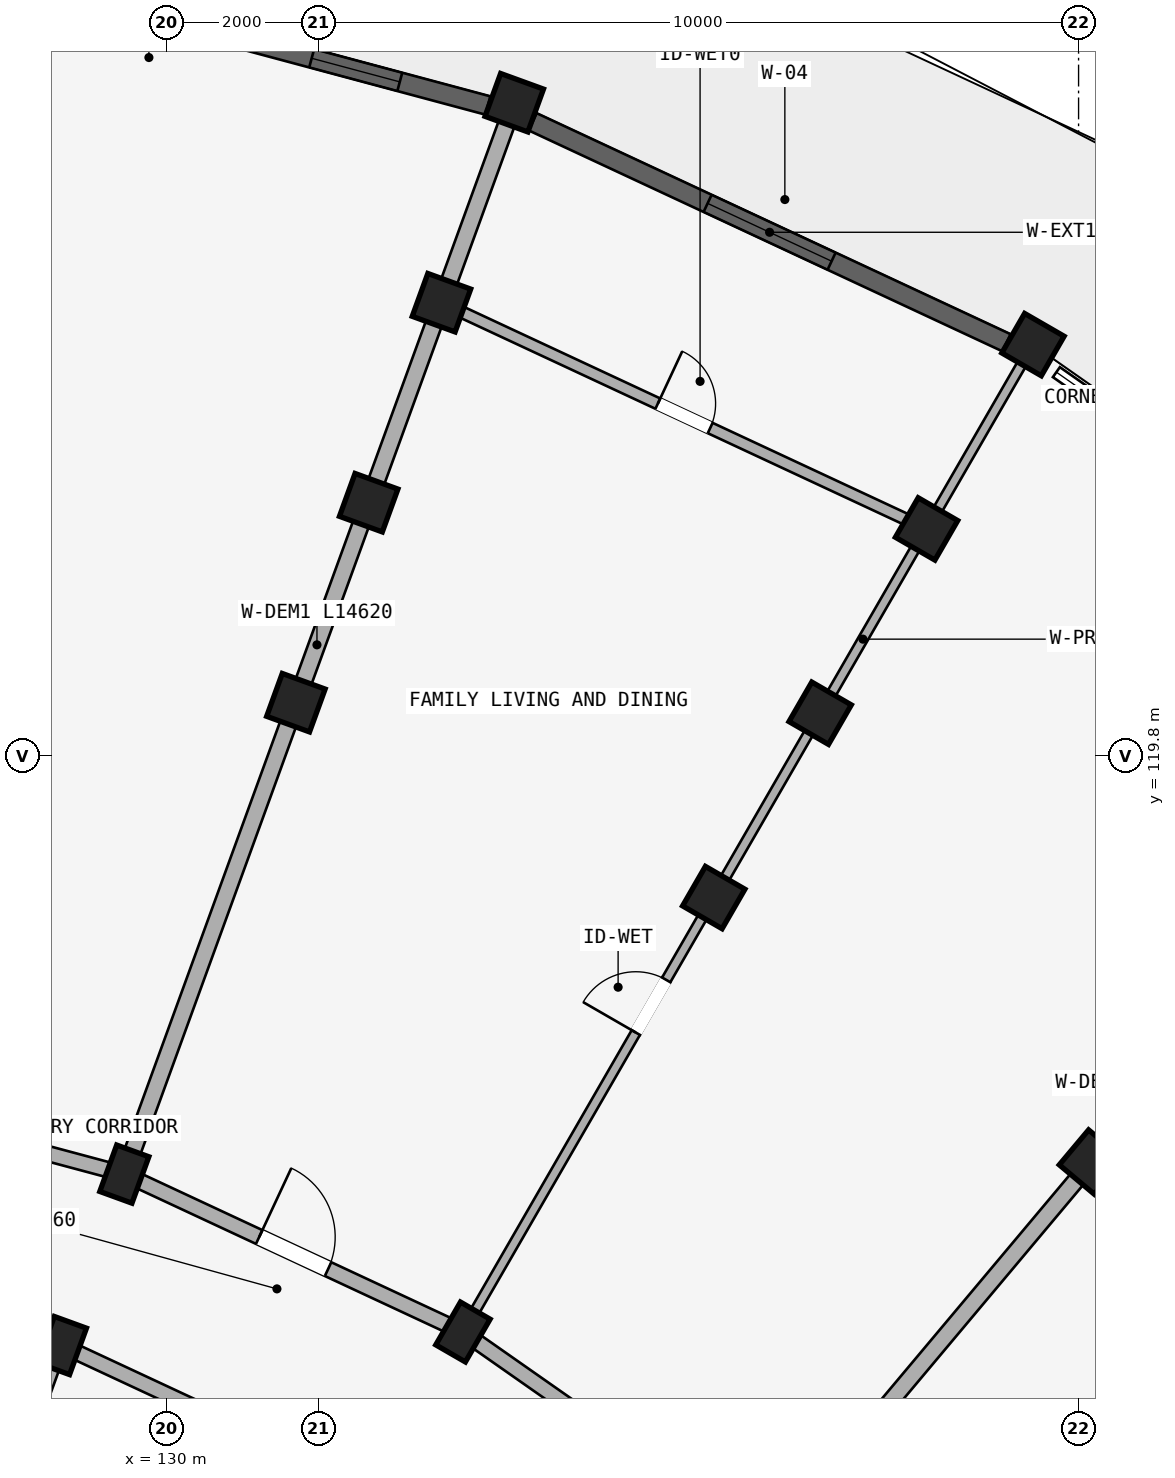
"""IFC4 building model, lengths in metres.
Left out: names, types, materials, properties, quantities, classifications, styles, units other than length and angle.
Written with IfcOpenShell. Run it as: python <this file> out.ifc"""

import sys

from ifc_helpers import new_model, si_unit, direction, frame, frame_2d, origin, origin_2d, place, context, subcontext, project, spatial, rectangle, extrude, element, fill, save


model = new_model("IFC4")
c1 = context("Model", 3, precision=1e-05, world=origin(), true_north=direction((0.0, 1.0)))
c2 = subcontext(c1, "Body", "Model", "MODEL_VIEW")
j1 = project(units=[si_unit("LENGTHUNIT", "METRE"), si_unit("PLANEANGLEUNIT", "RADIAN")], contexts=[c1])
p1 = place(None, origin())
s1 = spatial("IfcSite", under=j1, at=p1, CompositionType="ELEMENT")
p2 = place(p1, origin())
s2 = spatial("IfcBuilding", under=s1, at=p2, CompositionType="ELEMENT")
p3 = place(p2, frame((0.0, 0.0, 30.75)))
s3 = spatial("IfcBuildingStorey", under=s2, at=p3, CompositionType="ELEMENT", Elevation=30.75)
for number, where, z_axis, x_axis in (
    (1, (128.624, 112.044, 0.0), (0.0, 0.0, 1.0), (-0.94, 0.342, 0.0)),
    (2, (129.445, 114.299, 0.0), (0.0, 0.0, 1.0), (-0.94, 0.342, 0.0)),
):
    element("IfcColumn", number, at=place(p3, frame(where, z_axis=z_axis, x_axis=x_axis)), inside=s3, PredefinedType="COLUMN", context=c2, shape_type="SweptSolid", body=[
        extrude(rectangle(XDim=0.45, YDim=0.65, at=origin_2d()), origin(), (0.0, 0.0, 1.0), 2.93),
    ])
for number, where, z_axis, x_axis in (
    (3, (131.702, 120.501, 0.0), (0.0, 0.0, 1.0), (-0.94, 0.342, 0.0)),
    (4, (132.66, 123.132, 0.0), (0.0, 0.0, 1.0), (-0.94, 0.342, 0.0)),
    (5, (133.618, 125.764, 0.0), (0.0, 0.0, 1.0), (-0.94, 0.342, 0.0)),
):
    element("IfcColumn", number, at=place(p3, frame(where, z_axis=z_axis, x_axis=x_axis)), inside=s3, PredefinedType="COLUMN", context=c2, shape_type="SweptSolid", body=[
        extrude(rectangle(XDim=0.6, YDim=0.6, at=origin_2d()), origin(), (0.0, 0.0, 1.0), 2.93),
    ])
p4 = place(p3, frame((134.575, 128.395, 0.0), z_axis=(0.0, 0.0, 1.0), x_axis=(-0.939692620786, 0.342020143326, 0.0)))
e6 = element("IfcColumn", 6, at=p4, inside=s3, PredefinedType="COLUMN", context=c2, shape_type="SweptSolid", body=[
    extrude(rectangle(XDim=0.6, YDim=0.6, at=origin_2d()), origin(), (0.0, 0.0, 1.0), 2.97),
])
p5 = place(p3, frame((133.9, 112.222, 0.0), z_axis=(0.0, 0.0, 1.0), x_axis=(-0.866025403784, 0.5, 0.0)))
e7 = element("IfcColumn", 7, at=p5, inside=s3, PredefinedType="COLUMN", context=c2, shape_type="SweptSolid", body=[
    extrude(rectangle(XDim=0.45, YDim=0.65, at=origin_2d()), origin(), (0.0, 0.0, 1.0), 2.93),
])
for number, where, z_axis, x_axis in (
    (8, (137.2, 117.938, 0.0), (0.0, 0.0, 1.0), (-0.866, 0.5, 0.0)),
    (9, (138.6, 120.363, 0.0), (0.0, 0.0, 1.0), (-0.866, 0.5, 0.0)),
    (10, (140.0, 122.787, 0.0), (0.0, 0.0, 1.0), (-0.866, 0.5, 0.0)),
):
    element("IfcColumn", number, at=place(p3, frame(where, z_axis=z_axis, x_axis=x_axis)), inside=s3, PredefinedType="COLUMN", context=c2, shape_type="SweptSolid", body=[
        extrude(rectangle(XDim=0.6, YDim=0.6, at=origin_2d()), origin(), (0.0, 0.0, 1.0), 2.93),
    ])
p6 = place(p3, frame((141.4, 125.212, 0.0), z_axis=(0.0, 0.0, 1.0), x_axis=(-0.866025403784, 0.5, 0.0)))
e11 = element("IfcColumn", 11, at=p6, inside=s3, PredefinedType="COLUMN", context=c2, shape_type="SweptSolid", body=[
    extrude(rectangle(XDim=0.6, YDim=0.6, at=origin_2d()), origin(), (0.0, 0.0, 1.0), 2.97),
])
p7 = place(p3, frame((142.169, 114.458, 0.0), z_axis=(0.0, 0.0, 1.0), x_axis=(-0.766044443119, 0.642787609687, 0.0)))
e12 = element("IfcColumn", 12, at=p7, inside=s3, PredefinedType="COLUMN", context=c2, shape_type="SweptSolid", body=[
    extrude(rectangle(XDim=0.6, YDim=0.6, at=origin_2d()), origin(), (0.0, 0.0, 1.0), 2.93),
])
p8 = place(p3, frame((124.28, 113.208, 0.0), z_axis=(0.0, 0.0, 1.0), x_axis=(0.965934240054, -0.258787642463, 0.0)))
e13 = element("IfcWall", 13, at=p8, inside=s3, PredefinedType="STANDARD", context=c2, shape_type="SweptSolid", body=[
    extrude(rectangle(XDim=4.497, YDim=0.2, at=frame_2d((2.249, 0.0))), origin(), (0.0, 0.0, 1.0), 2.372),
])
p9 = place(p3, frame((124.697, 115.572, 0.0), z_axis=(0.0, 0.0, 1.0), x_axis=(0.965930095386, -0.258803112091, 0.0)))
e14 = element("IfcWall", 14, at=p9, inside=s3, PredefinedType="STANDARD", context=c2, shape_type="SweptSolid", body=[
    extrude(rectangle(XDim=4.916, YDim=0.2, at=frame_2d((2.458, 0.0))), origin(), (0.0, 0.0, 1.0), 2.372),
])
p10 = place(p3, frame((128.624, 112.044, 0.0), z_axis=(0.0, 0.0, 1.0), x_axis=(0.906307919131, -0.422617978463, 0.0)))
e15 = element("IfcWall", 15, at=p10, inside=s3, PredefinedType="STANDARD", context=c2, shape_type="SweptSolid", body=[
    extrude(rectangle(XDim=4.497, YDim=0.2, at=frame_2d((2.249, 0.0))), origin(), (0.0, 0.0, 1.0), 2.372),
])
p11 = place(p3, frame((129.445, 114.299, 0.0), z_axis=(0.0, 0.0, 1.0), x_axis=(0.906302381024, -0.422629854778, 0.0)))
e16 = element("IfcWall", 16, at=p11, inside=s3, PredefinedType="STANDARD", context=c2, shape_type="SweptSolid", body=[
    extrude(rectangle(XDim=4.915, YDim=0.2, at=frame_2d((2.458, 0.0))), origin(), (0.0, 0.0, 1.0), 2.372),
])
p12 = place(p11, frame((1.958, 0.0, 0.0)))
e17 = element("IfcOpeningElement", 17, at=p12, cuts=e16, PredefinedType="OPENING", context=c2, shape_type="SweptSolid", body=[
    extrude(rectangle(XDim=1.0, YDim=2.15, at=frame_2d((0.5, 1.075))), frame((0.0, 0.11, 0.0), z_axis=(0.0, -1.0, 0.0), x_axis=(1.0, 0.0, 0.0)), (0.0, 0.0, 1.0), 0.22),
])
p13 = place(p3, frame((133.9, 112.222, 0.0), z_axis=(0.0, 0.0, 1.0), x_axis=(0.819140911474, -0.573592335331, 0.0)))
e18 = element("IfcWall", 18, at=p13, inside=s3, PredefinedType="STANDARD", context=c2, shape_type="SweptSolid", body=[
    extrude(rectangle(XDim=4.916, YDim=0.2, at=frame_2d((2.458, 0.0))), origin(), (0.0, 0.0, 1.0), 2.372),
])
p14 = place(p3, frame((126.298, 105.654, 0.0), z_axis=(0.0, 0.0, 1.0), x_axis=(0.342010221662, 0.939696231917, 0.0)))
e19 = element("IfcWall", 19, at=p14, inside=s3, PredefinedType="PARTITIONING", context=c2, shape_type="SweptSolid", body=[
    extrude(rectangle(XDim=6.75, YDim=0.15, at=frame_2d((3.375, 0.0))), origin(), (0.0, 0.0, 1.0), 2.372),
])
p15 = place(p14, frame((3.262, 0.0, 0.0)))
e20 = element("IfcOpeningElement", 20, at=p15, cuts=e19, PredefinedType="OPENING", context=c2, shape_type="SweptSolid", body=[
    extrude(rectangle(XDim=0.9, YDim=2.1, at=frame_2d((0.45, 1.05))), frame((0.0, 0.085, 0.0), z_axis=(0.0, -1.0, 0.0), x_axis=(1.0, 0.0, 0.0)), (0.0, 0.0, 1.0), 0.17),
])
p16 = place(p3, frame((129.479, 114.393, 0.0), z_axis=(0.0, 0.0, 1.0), x_axis=(0.342015232663, 0.939694408106, 0.0)))
e21 = element("IfcWall", 21, at=p16, inside=s3, PredefinedType="STANDARD", context=c2, shape_type="SweptSolid", body=[
    extrude(rectangle(XDim=14.62, YDim=0.22, at=frame_2d((7.31, 0.0))), origin(), (0.0, 0.0, 1.0), 2.372),
])
p17 = place(p3, frame((133.95, 112.309, 0.0), z_axis=(0.0, 0.0, 1.0), x_axis=(0.500007702989, 0.866020956416, 0.0)))
e22 = element("IfcWall", 22, at=p17, inside=s3, PredefinedType="PARTITIONING", context=c2, shape_type="SweptSolid", body=[
    extrude(rectangle(XDim=14.62, YDim=0.125, at=frame_2d((7.31, 0.0))), origin(), (0.0, 0.0, 1.0), 2.372),
])
p18 = place(p17, frame((4.449, 0.0, 0.0)))
e23 = element("IfcOpeningElement", 23, at=p18, cuts=e22, PredefinedType="OPENING", context=c2, shape_type="SweptSolid", body=[
    extrude(rectangle(XDim=0.8, YDim=2.1, at=frame_2d((0.4, 1.05))), frame((0.0, 0.073, 0.0), z_axis=(0.0, -1.0, 0.0), x_axis=(1.0, 0.0, 0.0)), (0.0, 0.0, 1.0), 0.145),
])
p19 = place(p3, frame((137.991, 109.479, 0.0), z_axis=(0.0, 0.0, 1.0), x_axis=(0.642779216656, 0.76605148563, 0.0)))
e24 = element("IfcWall", 24, at=p19, inside=s3, PredefinedType="STANDARD", context=c2, shape_type="SweptSolid", body=[
    extrude(rectangle(XDim=14.62, YDim=0.22, at=frame_2d((7.31, 0.0))), origin(), (0.0, 0.0, 1.0), 2.372),
])
p20 = place(p3, frame((141.479, 105.991, 0.0), z_axis=(0.0, 0.0, 1.0), x_axis=(0.76605148563, 0.642779216656, 0.0)))
e25 = element("IfcWall", 25, at=p20, inside=s3, PredefinedType="PARTITIONING", context=c2, shape_type="SweptSolid", body=[
    extrude(rectangle(XDim=14.62, YDim=0.125, at=frame_2d((7.31, 0.0))), origin(), (0.0, 0.0, 1.0), 2.372),
])
p21 = place(p20, frame((4.449, 0.0, 0.0)))
e26 = element("IfcOpeningElement", 26, at=p21, cuts=e25, PredefinedType="OPENING", context=c2, shape_type="SweptSolid", body=[
    extrude(rectangle(XDim=0.8, YDim=2.1, at=frame_2d((0.4, 1.05))), frame((0.0, 0.073, 0.0), z_axis=(0.0, -1.0, 0.0), x_axis=(1.0, 0.0, 0.0)), (0.0, 0.0, 1.0), 0.145),
])
p22 = place(p3, frame((133.618, 125.764, 0.0), z_axis=(0.0, 0.0, 1.0), x_axis=(0.906297360311, -0.422640621205, 0.0)))
e27 = element("IfcWall", 27, at=p22, inside=s3, PredefinedType="PLUMBINGWALL", context=c2, shape_type="SweptSolid", body=[
    extrude(rectangle(XDim=7.042, YDim=0.15, at=frame_2d((3.521, 0.0))), origin(), (0.0, 0.0, 1.0), 2.372),
])
p23 = place(p22, frame((3.141, 0.0, 0.0)))
e28 = element("IfcOpeningElement", 28, at=p23, cuts=e27, PredefinedType="OPENING", context=c2, shape_type="SweptSolid", body=[
    extrude(rectangle(XDim=0.76, YDim=2.05, at=frame_2d((0.38, 1.025))), frame((0.0, 0.085, 0.0), z_axis=(0.0, -1.0, 0.0), x_axis=(1.0, 0.0, 0.0)), (0.0, 0.0, 1.0), 0.17),
])
p24 = place(p3, frame((127.584, 130.139, 0.0), z_axis=(0.0, 0.0, 1.0), x_axis=(0.965921436109, -0.258835428922, 0.0)))
e29 = element("IfcWall", 29, at=p24, inside=s3, PredefinedType="STANDARD", context=c2, shape_type="SweptSolid", body=[
    extrude(rectangle(XDim=6.879, YDim=0.25, at=frame_2d((3.439, 0.0))), origin(), (0.0, 0.0, 1.0), 2.412),
])
p25 = place(p24, frame((4.479, 0.0, 0.462)))
e30 = element("IfcOpeningElement", 30, at=p25, cuts=e29, PredefinedType="OPENING", context=c2, shape_type="SweptSolid", body=[
    extrude(rectangle(XDim=1.2, YDim=1.5, at=frame_2d((0.6, 0.75))), frame((0.0, 0.135, 0.0), z_axis=(0.0, -1.0, 0.0), x_axis=(1.0, 0.0, 0.0)), (0.0, 0.0, 1.0), 0.27),
])
p26 = place(p24, frame((1.748, 0.0, 0.0)))
e31 = element("IfcOpeningElement", 31, at=p26, cuts=e29, PredefinedType="OPENING", context=c2, shape_type="SweptSolid", body=[
    extrude(rectangle(XDim=1.32, YDim=2.15, at=frame_2d((0.66, 1.075))), frame((0.0, 0.135, 0.0), z_axis=(0.0, -1.0, 0.0), x_axis=(1.0, 0.0, 0.0)), (0.0, 0.0, 1.0), 0.27),
])
p27 = place(p3, frame((134.818, 128.144, 0.0), z_axis=(0.0, 0.0, 1.0), x_axis=(0.906302789289, -0.422628979279, 0.0)))
e32 = element("IfcWall", 32, at=p27, inside=s3, PredefinedType="STANDARD", context=c2, shape_type="SweptSolid", body=[
    extrude(rectangle(XDim=6.879, YDim=0.25, at=frame_2d((3.439, 0.0))), origin(), (0.0, 0.0, 1.0), 2.412),
])
p28 = place(p27, frame((2.54, 0.0, 0.562)))
e33 = element("IfcOpeningElement", 33, at=p28, cuts=e32, PredefinedType="OPENING", context=c2, shape_type="SweptSolid", body=[
    extrude(rectangle(XDim=1.8, YDim=1.65, at=frame_2d((0.9, 0.825))), frame((0.0, 0.135, 0.0), z_axis=(0.0, -1.0, 0.0), x_axis=(1.0, 0.0, 0.0)), (0.0, 0.0, 1.0), 0.27),
])
p29 = place(p25, origin())
e34 = element("IfcWindow", 34, at=p29, inside=s3, PartitioningType="SINGLE_PANEL", PredefinedType="WINDOW", context=c2, shape_type="SweptSolid", body=[
    extrude(rectangle(XDim=1.2, YDim=1.5, at=frame_2d((0.6, 0.75))), frame((0.0, 0.03, 0.0), z_axis=(0.0, -1.0, 0.0), x_axis=(1.0, 0.0, 0.0)), (0.0, 0.0, 1.0), 0.06),
])
fill(e30, e34)
p30 = place(p28, origin())
e35 = element("IfcWindow", 35, at=p30, inside=s3, PartitioningType="DOUBLE_PANEL_VERTICAL", PredefinedType="WINDOW", context=c2, shape_type="SweptSolid", body=[
    extrude(rectangle(XDim=1.8, YDim=1.65, at=frame_2d((0.9, 0.825))), frame((0.0, 0.03, 0.0), z_axis=(0.0, -1.0, 0.0), x_axis=(1.0, 0.0, 0.0)), (0.0, 0.0, 1.0), 0.06),
])
fill(e33, e35)
p31 = place(p18, frame((0.8, 0.0, 0.0), z_axis=(0.0, 0.0, 1.0), x_axis=(-1.0, 0.0, 0.0)))
e36 = element("IfcDoor", 36, at=p31, inside=s3, OperationType="SINGLE_SWING_RIGHT", PredefinedType="DOOR", context=c2, shape_type="SweptSolid", body=[
    extrude(rectangle(XDim=0.8, YDim=2.1, at=frame_2d((0.4, 1.05))), frame((0.0, 0.025, 0.0), z_axis=(0.0, -1.0, 0.0), x_axis=(1.0, 0.0, 0.0)), (0.0, 0.0, 1.0), 0.05),
])
fill(e23, e36)
p32 = place(p12, origin())
e37 = element("IfcDoor", 37, at=p32, inside=s3, OperationType="SINGLE_SWING_LEFT", PredefinedType="DOOR", context=c2, shape_type="SweptSolid", body=[
    extrude(rectangle(XDim=1.0, YDim=2.15, at=frame_2d((0.5, 1.075))), frame((0.0, 0.025, 0.0), z_axis=(0.0, -1.0, 0.0), x_axis=(1.0, 0.0, 0.0)), (0.0, 0.0, 1.0), 0.05),
])
fill(e17, e37)
p33 = place(p23, frame((0.76, 0.0, 0.0), z_axis=(0.0, 0.0, 1.0), x_axis=(-1.0, 0.0, 0.0)))
e38 = element("IfcDoor", 38, at=p33, inside=s3, OperationType="SINGLE_SWING_RIGHT", PredefinedType="DOOR", context=c2, shape_type="SweptSolid", body=[
    extrude(rectangle(XDim=0.76, YDim=2.05, at=frame_2d((0.38, 1.025))), frame((0.0, 0.025, 0.0), z_axis=(0.0, -1.0, 0.0), x_axis=(1.0, 0.0, 0.0)), (0.0, 0.0, 1.0), 0.05),
])
fill(e28, e38)
save(model, sys.argv[1])
